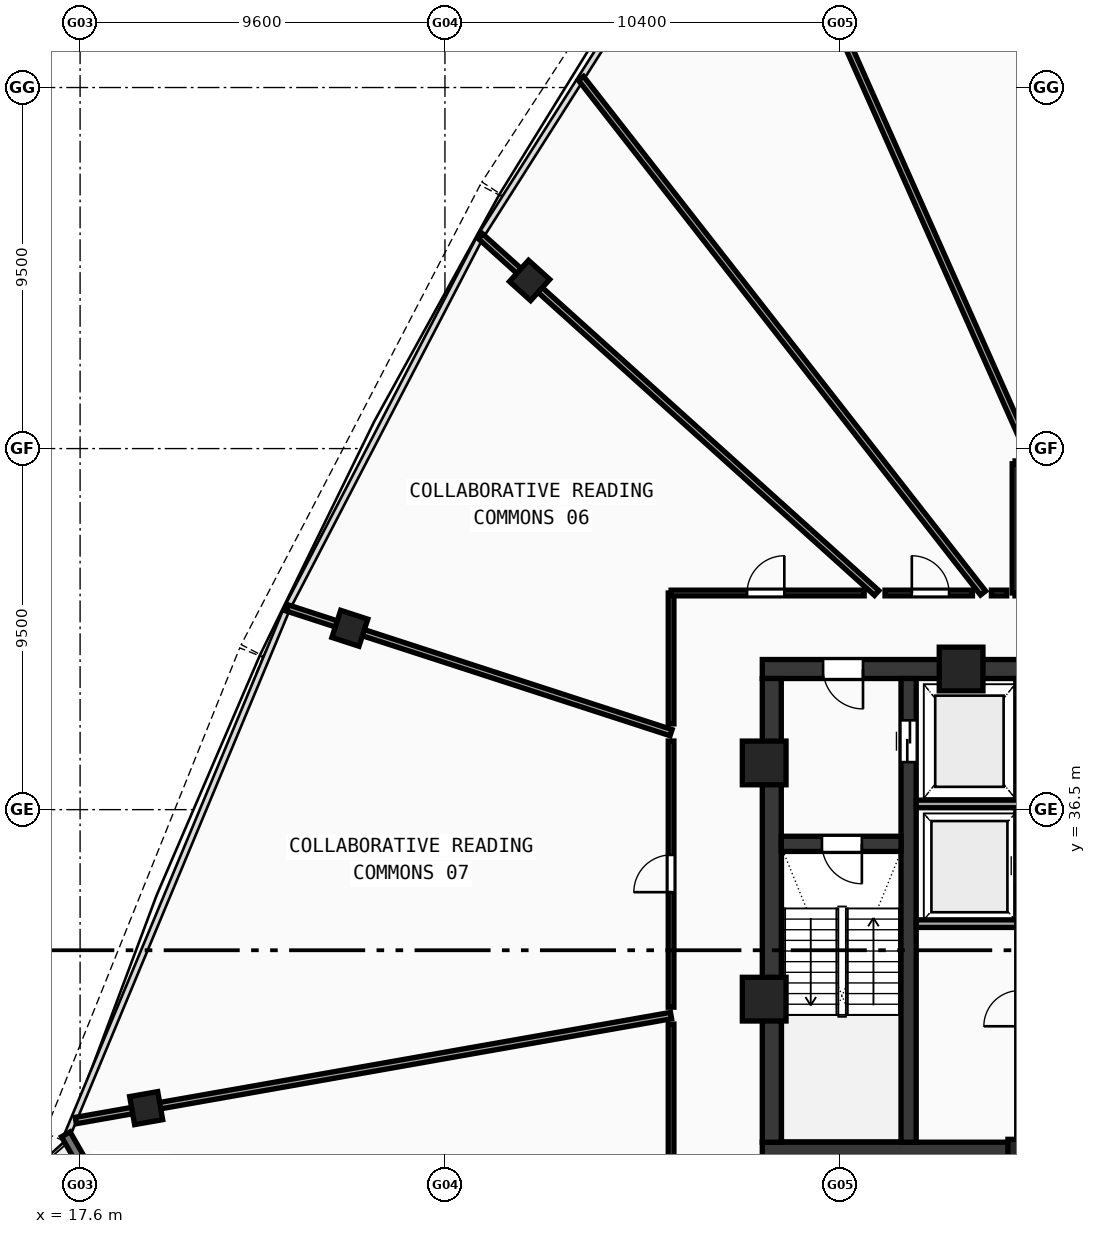
"""IFC4 building model, lengths in metres.
Left out: names, types, materials, properties, quantities, classifications, styles, units other than length and angle.
Written with IfcOpenShell. Run it as: python <this file> out.ifc"""

import sys

from ifc_helpers import new_model, si_unit, direction, frame, frame_2d, origin, origin_with_axes, origin_2d, place, context, subcontext, project, spatial, rectangle, hollow_rectangle, extrude, source, transform, mapped, element, fill, save


model = new_model("IFC4")
c1 = context("Model", 3, precision=1e-05, world=origin(), true_north=direction((0.0, 1.0)))
c2 = subcontext(c1, "Body", "Model", "MODEL_VIEW")
j1 = project(units=[si_unit("LENGTHUNIT", "METRE"), si_unit("PLANEANGLEUNIT", "RADIAN")], contexts=[c1])
p1 = place(None, origin())
s1 = spatial("IfcSite", under=j1, at=p1, CompositionType="ELEMENT")
p2 = place(p1, origin())
s2 = spatial("IfcBuilding", under=s1, at=p2, CompositionType="ELEMENT")
p3 = place(p2, frame((0.0, 0.0, 307.4)))
s3 = spatial("IfcBuildingStorey", under=s2, at=p3, CompositionType="ELEMENT", Elevation=307.4)
p4 = place(p3, frame((35.55, 27.5, 0.0), z_axis=(0.0, 0.0, 1.0), x_axis=(1.0, 0.0, 0.0)))
e1 = element("IfcWall", 1, at=p4, inside=s3, PredefinedType="SHEAR", context=c2, shape_type="SweptSolid", body=[
    extrude(rectangle(XDim=24.9, YDim=0.5, at=frame_2d((12.45, 0.0))), origin(), (0.0, 0.0, 1.0), 3.47),
])
p5 = place(p3, frame((35.55, 40.2, 0.0), z_axis=(0.0, 0.0, 1.0), x_axis=(1.0, 0.0, 0.0)))
e2 = element("IfcWall", 2, at=p5, inside=s3, PredefinedType="SHEAR", context=c2, shape_type="SweptSolid", body=[
    extrude(rectangle(XDim=11.25, YDim=0.5, at=frame_2d((5.625, 0.0))), origin(), (0.0, 0.0, 1.0), 3.47),
])
p6 = place(p5, frame((1.6, 0.0, 0.0)))
e3 = element("IfcOpeningElement", 3, at=p6, cuts=e2, PredefinedType="OPENING", context=c2, shape_type="SweptSolid", body=[
    extrude(rectangle(XDim=1.05, YDim=2.1, at=frame_2d((0.525, 1.05))), frame((0.0, 0.26, 0.0), z_axis=(0.0, -1.0, 0.0), x_axis=(1.0, 0.0, 0.0)), (0.0, 0.0, 1.0), 0.52),
])
p7 = place(p3, frame((35.8, 27.75, 0.0), z_axis=(0.0, 0.0, 1.0), x_axis=(0.0, 1.0, 0.0)))
e4 = element("IfcWall", 4, at=p7, inside=s3, PredefinedType="SHEAR", context=c2, shape_type="SweptSolid", body=[
    extrude(rectangle(XDim=12.2, YDim=0.5, at=frame_2d((6.1, 0.0))), origin(), (0.0, 0.0, 1.0), 3.47),
])
p8 = place(p3, frame((39.4, 27.75, 0.0), z_axis=(0.0, 0.0, 1.0), x_axis=(0.0, 1.0, 0.0)))
e5 = element("IfcWall", 5, at=p8, inside=s3, PredefinedType="SHEAR", context=c2, shape_type="SweptSolid", body=[
    extrude(rectangle(XDim=12.2, YDim=0.4, at=frame_2d((6.1, 0.0))), origin(), (0.0, 0.0, 1.0), 3.47),
])
p9 = place(p8, frame((10.0, 0.0, 0.0)))
e6 = element("IfcOpeningElement", 6, at=p9, cuts=e5, PredefinedType="OPENING", context=c2, shape_type="SweptSolid", body=[
    extrude(rectangle(XDim=1.1, YDim=2.1, at=frame_2d((0.55, 1.05))), frame((0.0, 0.21, 0.0), z_axis=(0.0, -1.0, 0.0), x_axis=(1.0, 0.0, 0.0)), (0.0, 0.0, 1.0), 0.42),
])
p10 = place(p3, frame((36.05, 35.6, 0.0), z_axis=(0.0, 0.0, 1.0), x_axis=(1.0, 0.0, 0.0)))
e7 = element("IfcWall", 7, at=p10, inside=s3, PredefinedType="SHEAR", context=c2, shape_type="SweptSolid", body=[
    extrude(rectangle(XDim=3.15, YDim=0.4, at=frame_2d((1.575, 0.0))), origin(), (0.0, 0.0, 1.0), 3.47),
])
p11 = place(p10, frame((1.07, 0.0, 0.0)))
e8 = element("IfcOpeningElement", 8, at=p11, cuts=e7, PredefinedType="OPENING", context=c2, shape_type="SweptSolid", body=[
    extrude(rectangle(XDim=1.05, YDim=2.1, at=frame_2d((0.525, 1.05))), frame((0.0, 0.21, 0.0), z_axis=(0.0, -1.0, 0.0), x_axis=(1.0, 0.0, 0.0)), (0.0, 0.0, 1.0), 0.42),
])
m1 = source(origin(), c2, "Body", "SweptSolid", [
    extrude(hollow_rectangle(XDim=1.15, YDim=1.15, WallThickness=0.048, at=origin_2d()), origin(), (0.0, 0.0, 1.0), 3.73),
])
for number, where, z_axis, x_axis in (
    (9, (42.588, 27.25, -0.26), (0.0, 0.0, 1.0), (1.0, 0.0, 0.0)),
    (10, (40.781, 40.2, -0.26), (0.0, 0.0, 1.0), (1.0, 0.0, 0.0)),
    (11, (35.6, 37.729, -0.26), (0.0, 0.0, 1.0), (1.0, 0.0, 0.0)),
    (12, (35.6, 31.513, -0.26), (0.0, 0.0, 1.0), (1.0, 0.0, 0.0)),
):
    element("IfcColumn", number, at=place(p3, frame(where, z_axis=z_axis, x_axis=x_axis)), inside=s3, PredefinedType="COLUMN", context=c2, shape_type="MappedRepresentation", body=[
        mapped(m1, transform((0.0, 0.0, 0.0), scale=1.0)),
    ])
m2 = source(origin(), c2, "Body", "SweptSolid", [
    extrude(hollow_rectangle(XDim=0.75, YDim=0.75, WallThickness=0.028, at=origin_2d()), origin(), (0.0, 0.0, 1.0), 3.73),
])
for number, where, z_axis, x_axis in (
    (13, (29.427, 50.424, -0.26), (0.0, 0.0, 1.0), (-0.669, -0.743, 0.0)),
    (14, (24.698, 41.271, -0.26), (0.0, 0.0, 1.0), (-0.309, -0.951, 0.0)),
    (15, (19.338, 28.646, -0.26), (0.0, 0.0, 1.0), (0.174, -0.985, 0.0)),
):
    element("IfcColumn", number, at=place(p3, frame(where, z_axis=z_axis, x_axis=x_axis)), inside=s3, PredefinedType="COLUMN", context=c2, shape_type="MappedRepresentation", body=[
        mapped(m2, transform((0.0, 0.0, 0.0), scale=1.0)),
    ])
p12 = place(p3, frame((17.223, 27.957, 0.0), z_axis=(0.0, 0.0, 1.0), x_axis=(0.49793943781, -0.867211805889, 0.0)))
e16 = element("IfcWall", 16, at=p12, inside=s3, PredefinedType="STANDARD", context=c2, shape_type="SweptSolid", body=[
    extrude(rectangle(XDim=6.903, YDim=0.26, at=frame_2d((3.452, 0.0))), origin(), (0.0, 0.0, 1.0), 3.47),
])
p13 = place(p12, frame((2.552, 0.0, 0.0)))
e17 = element("IfcOpeningElement", 17, at=p13, cuts=e16, PredefinedType="OPENING", context=c2, shape_type="SweptSolid", body=[
    extrude(rectangle(XDim=1.8, YDim=2.15, at=frame_2d((0.9, 1.075))), frame((0.0, 0.14, 0.0), z_axis=(0.0, -1.0, 0.0), x_axis=(1.0, 0.0, 0.0)), (0.0, 0.0, 1.0), 0.28),
])
p14 = place(p3, frame((42.32, 33.5, 0.0), z_axis=(0.0, 0.0, 1.0), x_axis=(0.0, 1.0, 0.0)))
e18 = element("IfcWall", 18, at=p14, inside=s3, PredefinedType="SOLIDWALL", context=c2, shape_type="SweptSolid", body=[
    extrude(rectangle(XDim=6.45, YDim=0.2, at=frame_2d((3.225, 0.0))), origin(), (0.0, 0.0, 1.0), 3.47),
])
p15 = place(p14, frame((1.0, 0.0, 0.0)))
e19 = element("IfcOpeningElement", 19, at=p15, cuts=e18, PredefinedType="OPENING", context=c2, shape_type="SweptSolid", body=[
    extrude(rectangle(XDim=1.05, YDim=2.1, at=frame_2d((0.525, 1.05))), frame((0.0, 0.11, 0.0), z_axis=(0.0, -1.0, 0.0), x_axis=(1.0, 0.0, 0.0)), (0.0, 0.0, 1.0), 0.22),
])
for number, where, z_axis, x_axis in (
    (20, (39.6, 36.65, 0.0), (0.0, 0.0, 1.0), (1.0, 0.0, 0.0)),
    (21, (39.6, 33.5, 0.0), (0.0, 0.0, 1.0), (1.0, 0.0, 0.0)),
):
    element("IfcWall", number, at=place(p3, frame(where, z_axis=z_axis, x_axis=x_axis)), inside=s3, PredefinedType="SOLIDWALL", context=c2, shape_type="SweptSolid", body=[
        extrude(rectangle(XDim=2.72, YDim=0.2, at=frame_2d((1.36, 0.0))), origin(), (0.0, 0.0, 1.0), 3.47),
    ])
p16 = place(p3, frame((42.2, 42.2, 0.0), z_axis=(0.0, 0.0, 1.0), x_axis=(1.0, 0.0, 0.0)))
e22 = element("IfcWall", 22, at=p16, inside=s3, PredefinedType="PARTITIONING", context=c2, shape_type="SweptSolid", body=[
    extrude(rectangle(XDim=5.0, YDim=0.15, at=frame_2d((2.5, 0.0))), origin(), (0.0, 0.0, 1.0), 2.87),
])
p17 = place(p16, frame((1.4, 0.0, 0.0)))
e23 = element("IfcOpeningElement", 23, at=p17, cuts=e22, PredefinedType="OPENING", context=c2, shape_type="SweptSolid", body=[
    extrude(rectangle(XDim=0.92, YDim=2.1, at=frame_2d((0.46, 1.05))), frame((0.0, 0.085, 0.0), z_axis=(0.0, -1.0, 0.0), x_axis=(1.0, 0.0, 0.0)), (0.0, 0.0, 1.0), 0.17),
])
p18 = place(p3, frame((42.2, 45.6, 0.0), z_axis=(0.0, 0.0, 1.0), x_axis=(1.0, 0.0, 0.0)))
e24 = element("IfcWall", 24, at=p18, inside=s3, PredefinedType="PARTITIONING", context=c2, shape_type="SweptSolid", body=[
    extrude(rectangle(XDim=5.0, YDim=0.15, at=frame_2d((2.5, 0.0))), origin(), (0.0, 0.0, 1.0), 2.87),
])
p19 = place(p3, frame((42.2, 42.2, 0.0), z_axis=(0.0, 0.0, 1.0), x_axis=(0.0, 1.0, 0.0)))
e25 = element("IfcWall", 25, at=p19, inside=s3, PredefinedType="PARTITIONING", context=c2, shape_type="SweptSolid", body=[
    extrude(rectangle(XDim=3.4, YDim=0.15, at=frame_2d((1.7, 0.0))), origin(), (0.0, 0.0, 1.0), 3.47),
])
p20 = place(p3, frame((42.702, 45.6, 0.0), z_axis=(0.0, 0.0, 1.0), x_axis=(-0.406747233578, 0.913540742374, 0.0)))
e26 = element("IfcWall", 26, at=p20, inside=s3, PredefinedType="PARTITIONING", context=c2, shape_type="SweptSolid", body=[
    extrude(rectangle(XDim=18.602, YDim=0.17, at=frame_2d((9.301, 0.0))), origin(), (0.0, 0.0, 1.0), 2.87),
])
p21 = place(p3, frame((41.359, 42.2, 0.0), z_axis=(0.0, 0.0, 1.0), x_axis=(-0.615656448173, 0.788014681223, 0.0)))
e27 = element("IfcWall", 27, at=p21, inside=s3, PredefinedType="PARTITIONING", context=c2, shape_type="SweptSolid", body=[
    extrude(rectangle(XDim=17.185, YDim=0.17, at=frame_2d((8.592, 0.0))), origin(), (0.0, 0.0, 1.0), 2.87),
])
p22 = place(p3, frame((38.56, 42.2, 0.0), z_axis=(0.0, 0.0, 1.0), x_axis=(-0.74314439151, 0.669131088329, 0.0)))
e28 = element("IfcWall", 28, at=p22, inside=s3, PredefinedType="PARTITIONING", context=c2, shape_type="SweptSolid", body=[
    extrude(rectangle(XDim=14.026, YDim=0.17, at=frame_2d((7.013, 0.0))), origin(), (0.0, 0.0, 1.0), 2.87),
])
p23 = place(p3, frame((33.15, 38.525, 0.0), z_axis=(0.0, 0.0, 1.0), x_axis=(-0.951060589798, 0.309004457141, 0.0)))
e29 = element("IfcWall", 29, at=p23, inside=s3, PredefinedType="PARTITIONING", context=c2, shape_type="SweptSolid", body=[
    extrude(rectangle(XDim=10.62, YDim=0.17, at=frame_2d((5.31, 0.0))), origin(), (0.0, 0.0, 1.0), 2.87),
])
p24 = place(p3, frame((33.15, 31.082, 0.0), z_axis=(0.0, 0.0, 1.0), x_axis=(-0.984807655248, -0.173648732116, 0.0)))
e30 = element("IfcWall", 30, at=p24, inside=s3, PredefinedType="PARTITIONING", context=c2, shape_type="SweptSolid", body=[
    extrude(rectangle(XDim=15.906, YDim=0.17, at=frame_2d((7.953, 0.0))), origin(), (0.0, 0.0, 1.0), 2.87),
])
p25 = place(p3, frame((33.15, 24.9, 0.0), z_axis=(0.0, 0.0, 1.0), x_axis=(0.0, 1.0, 0.0)))
e31 = element("IfcWall", 31, at=p25, inside=s3, PredefinedType="PARTITIONING", context=c2, shape_type="SweptSolid", body=[
    extrude(rectangle(XDim=5.958, YDim=0.15, at=frame_2d((2.979, 0.0))), origin(), (0.0, 0.0, 1.0), 3.12),
])
p26 = place(p3, frame((33.15, 31.301, 0.0), z_axis=(0.0, 0.0, 1.0), x_axis=(0.0, 1.0, 0.0)))
e32 = element("IfcWall", 32, at=p26, inside=s3, PredefinedType="PARTITIONING", context=c2, shape_type="SweptSolid", body=[
    extrude(rectangle(XDim=7.004, YDim=0.15, at=frame_2d((3.502, 0.0))), origin(), (0.0, 0.0, 1.0), 3.47),
])
p27 = place(p26, frame((3.027, 0.0, 0.0)))
e33 = element("IfcOpeningElement", 33, at=p27, cuts=e32, PredefinedType="OPENING", context=c2, shape_type="SweptSolid", body=[
    extrude(rectangle(XDim=0.98, YDim=2.12, at=frame_2d((0.49, 1.06))), frame((0.0, 0.085, 0.0), z_axis=(0.0, -1.0, 0.0), x_axis=(1.0, 0.0, 0.0)), (0.0, 0.0, 1.0), 0.17),
])
p28 = place(p3, frame((33.15, 38.756, 0.0), z_axis=(0.0, 0.0, 1.0), x_axis=(0.0, 1.0, 0.0)))
e34 = element("IfcWall", 34, at=p28, inside=s3, PredefinedType="PARTITIONING", context=c2, shape_type="SweptSolid", body=[
    extrude(rectangle(XDim=3.444, YDim=0.15, at=frame_2d((1.722, 0.0))), origin(), (0.0, 0.0, 1.0), 3.12),
])
p29 = place(p3, frame((33.15, 42.2, 0.0), z_axis=(0.0, 0.0, 1.0), x_axis=(1.0, 0.0, 0.0)))
e35 = element("IfcWall", 35, at=p29, inside=s3, PredefinedType="PARTITIONING", context=c2, shape_type="SweptSolid", body=[
    extrude(rectangle(XDim=5.081, YDim=0.15, at=frame_2d((2.541, 0.0))), origin(), (0.0, 0.0, 1.0), 3.12),
])
p30 = place(p29, frame((2.0, 0.0, 0.0)))
e36 = element("IfcOpeningElement", 36, at=p30, cuts=e35, PredefinedType="OPENING", context=c2, shape_type="SweptSolid", body=[
    extrude(rectangle(XDim=0.98, YDim=2.12, at=frame_2d((0.49, 1.06))), frame((0.0, 0.085, 0.0), z_axis=(0.0, -1.0, 0.0), x_axis=(1.0, 0.0, 0.0)), (0.0, 0.0, 1.0), 0.17),
])
p31 = place(p3, frame((38.78, 42.2, 0.0), z_axis=(0.0, 0.0, 1.0), x_axis=(1.0, 0.0, 0.0)))
e37 = element("IfcWall", 37, at=p31, inside=s3, PredefinedType="PARTITIONING", context=c2, shape_type="SweptSolid", body=[
    extrude(rectangle(XDim=2.3, YDim=0.15, at=frame_2d((1.15, 0.0))), origin(), (0.0, 0.0, 1.0), 2.87),
])
p32 = place(p31, frame((0.705, 0.0, 0.0)))
e38 = element("IfcOpeningElement", 38, at=p32, cuts=e37, PredefinedType="OPENING", context=c2, shape_type="SweptSolid", body=[
    extrude(rectangle(XDim=0.98, YDim=2.12, at=frame_2d((0.49, 1.06))), frame((0.0, 0.085, 0.0), z_axis=(0.0, -1.0, 0.0), x_axis=(1.0, 0.0, 0.0)), (0.0, 0.0, 1.0), 0.17),
])
p33 = place(p3, frame((41.579, 42.2, 0.0), z_axis=(0.0, 0.0, 1.0), x_axis=(1.0, 0.0, 0.0)))
e39 = element("IfcWall", 39, at=p33, inside=s3, PredefinedType="PARTITIONING", context=c2, shape_type="SweptSolid", body=[
    extrude(rectangle(XDim=0.401, YDim=0.15, at=frame_2d((0.201, 0.0))), origin(), (0.0, 0.0, 1.0), 3.47),
])
m3 = source(origin(), c2, "Body", "SweptSolid", [
    extrude(rectangle(XDim=1.05, YDim=2.1, at=frame_2d((0.525, 1.05))), frame((0.0, 0.025, 0.0), z_axis=(0.0, -1.0, 0.0), x_axis=(1.0, 0.0, 0.0)), (0.0, 0.0, 1.0), 0.05),
])
p34 = place(p11, frame((1.05, 0.0, 0.0), z_axis=(0.0, 0.0, 1.0), x_axis=(-1.0, 0.0, 0.0)))
e40 = element("IfcDoor", 40, at=p34, inside=s3, OperationType="SINGLE_SWING_LEFT", PredefinedType="DOOR", context=c2, shape_type="MappedRepresentation", body=[
    mapped(m3, transform((0.0, 0.0, 0.0), scale=1.0)),
])
fill(e8, e40)
p35 = place(p6, frame((1.05, 0.0, 0.0), z_axis=(0.0, 0.0, 1.0), x_axis=(-1.0, 0.0, 0.0)))
e41 = element("IfcDoor", 41, at=p35, inside=s3, OperationType="SINGLE_SWING_LEFT", PredefinedType="DOOR", context=c2, shape_type="MappedRepresentation", body=[
    mapped(m3, transform((0.0, 0.0, 0.0), scale=1.0)),
])
fill(e3, e41)
m4 = source(origin(), c2, "Body", "SweptSolid", [
    extrude(rectangle(XDim=1.1, YDim=2.1, at=frame_2d((0.55, 1.05))), frame((0.0, 0.025, 0.0), z_axis=(0.0, -1.0, 0.0), x_axis=(1.0, 0.0, 0.0)), (0.0, 0.0, 1.0), 0.05),
])
p36 = place(p9, frame((1.1, 0.0, 0.0), z_axis=(0.0, 0.0, 1.0), x_axis=(-1.0, 0.0, 0.0)))
e42 = element("IfcDoor", 42, at=p36, inside=s3, OperationType="DOUBLE_DOOR_SLIDING", PredefinedType="DOOR", context=c2, shape_type="MappedRepresentation", body=[
    mapped(m4, transform((0.0, 0.0, 0.0), scale=1.0)),
])
fill(e6, e42)
m5 = source(origin(), c2, "Body", "SweptSolid", [
    extrude(rectangle(XDim=0.98, YDim=2.12, at=frame_2d((0.49, 1.06))), frame((0.0, 0.025, 0.0), z_axis=(0.0, -1.0, 0.0), x_axis=(1.0, 0.0, 0.0)), (0.0, 0.0, 1.0), 0.05),
])
p37 = place(p32, origin_with_axes())
e43 = element("IfcDoor", 43, at=p37, inside=s3, OperationType="SINGLE_SWING_LEFT", PredefinedType="DOOR", context=c2, shape_type="MappedRepresentation", body=[
    mapped(m5, transform((0.0, 0.0, 0.0), scale=1.0)),
])
fill(e38, e43)
p38 = place(p30, origin_with_axes())
e44 = element("IfcDoor", 44, at=p38, inside=s3, OperationType="SINGLE_SWING_RIGHT", PredefinedType="DOOR", context=c2, shape_type="MappedRepresentation", body=[
    mapped(m5, transform((0.0, 0.0, 0.0), scale=1.0)),
])
fill(e36, e44)
p39 = place(p27, origin_with_axes())
e45 = element("IfcDoor", 45, at=p39, inside=s3, OperationType="SINGLE_SWING_LEFT", PredefinedType="DOOR", context=c2, shape_type="MappedRepresentation", body=[
    mapped(m5, transform((0.0, 0.0, 0.0), scale=1.0)),
])
fill(e33, e45)
save(model, sys.argv[1])
